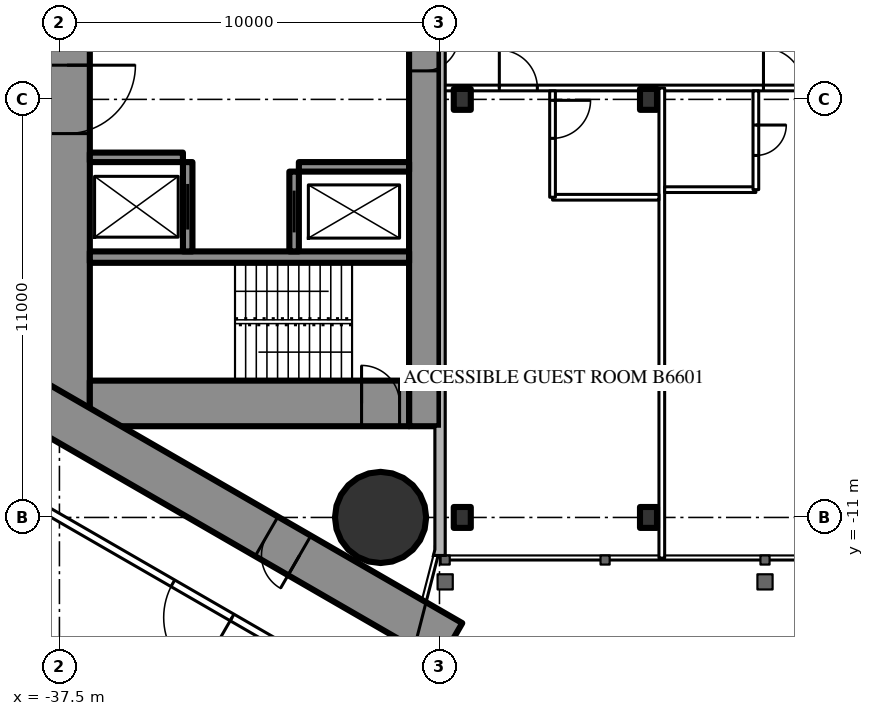
"""IFC4 building model, lengths in metres.
Left out: names, types, materials, properties, quantities, classifications, styles, units other than length and angle.
Written with IfcOpenShell. Run it as: python <this file> out.ifc"""

import sys

from ifc_helpers import new_model, si_unit, direction, frame, frame_2d, origin, origin_2d, place, context, subcontext, project, spatial, rectangle, circle, i_section, extrude, element, fill, save


model = new_model("IFC4")
c1 = context("Model", 3, precision=1e-05, world=origin(), true_north=direction((0.0, 1.0)))
c2 = subcontext(c1, "Body", "Model", "MODEL_VIEW")
j1 = project(units=[si_unit("LENGTHUNIT", "METRE"), si_unit("PLANEANGLEUNIT", "RADIAN")], contexts=[c1])
p1 = place(None, origin())
s1 = spatial("IfcSite", under=j1, at=p1, CompositionType="ELEMENT")
p2 = place(p1, origin())
s2 = spatial("IfcBuilding", under=s1, at=p2, CompositionType="ELEMENT")
p3 = place(p2, frame((0.0, 0.0, 247.7)))
s3 = spatial("IfcBuildingStorey", under=s2, at=p3, CompositionType="ELEMENT", Elevation=247.7)
p4 = place(p3, frame((-29.05, -11.0, 0.0), z_axis=(0.0, 0.0, 1.0), x_axis=(1.0, 0.0, 0.0)))
e1 = element("IfcColumn", 1, at=p4, inside=s3, PredefinedType="COLUMN", context=c2, shape_type="SweptSolid", body=[
    extrude(circle(Radius=1.2, at=origin_2d()), origin(), (0.0, 0.0, 1.0), 4.2),
])
p5 = place(p3, frame((-27.9, 8.6, 0.0), z_axis=(0.0, 0.0, 1.0), x_axis=(0.0, -1.0, 0.0)))
e2 = element("IfcWall", 2, at=p5, inside=s3, PredefinedType="SHEAR", context=c2, shape_type="SweptSolid", body=[
    extrude(rectangle(XDim=17.2, YDim=0.8, at=frame_2d((8.6, 0.0))), origin(), (0.0, 0.0, 1.0), 4.2),
])
p6 = place(p5, frame((6.95, 0.0, 0.0)))
e3 = element("IfcOpeningElement", 3, at=p6, cuts=e2, PredefinedType="OPENING", context=c2, shape_type="SweptSolid", body=[
    extrude(rectangle(XDim=0.9, YDim=2.2, at=frame_2d((0.45, 1.1))), frame((0.0, 0.41, 0.0), z_axis=(0.0, -1.0, 0.0), x_axis=(1.0, 0.0, 0.0)), (0.0, 0.0, 1.0), 0.82),
])
p7 = place(p3, frame((-37.3, 8.6, 0.0), z_axis=(0.0, 0.0, 1.0), x_axis=(0.0, -1.0, 0.0)))
e4 = element("IfcWall", 4, at=p7, inside=s3, PredefinedType="SHEAR", context=c2, shape_type="SweptSolid", body=[
    extrude(rectangle(XDim=17.2, YDim=1.2, at=frame_2d((8.6, 0.0))), origin(), (0.0, 0.0, 1.0), 4.2),
])
p8 = place(p7, frame((7.7, 0.0, 0.0)))
e5 = element("IfcOpeningElement", 5, at=p8, cuts=e4, PredefinedType="OPENING", context=c2, shape_type="SweptSolid", body=[
    extrude(rectangle(XDim=1.8, YDim=2.2, at=frame_2d((0.9, 1.1))), frame((0.0, 0.61, 0.0), z_axis=(0.0, -1.0, 0.0), x_axis=(1.0, 0.0, 0.0)), (0.0, 0.0, 1.0), 1.22),
])
p9 = place(p3, frame((-28.3, -8.0, 0.0), z_axis=(0.0, 0.0, 1.0), x_axis=(-1.0, 0.0, 0.0)))
e6 = element("IfcWall", 6, at=p9, inside=s3, PredefinedType="SHEAR", context=c2, shape_type="SweptSolid", body=[
    extrude(rectangle(XDim=8.4, YDim=1.2, at=frame_2d((4.2, 0.0))), origin(), (0.0, 0.0, 1.0), 4.2),
])
p10 = place(p9, frame((0.25, 0.0, 0.0)))
e7 = element("IfcOpeningElement", 7, at=p10, cuts=e6, PredefinedType="OPENING", context=c2, shape_type="SweptSolid", body=[
    extrude(rectangle(XDim=1.0, YDim=2.2, at=frame_2d((0.5, 1.1))), frame((0.0, 0.61, 0.0), z_axis=(0.0, -1.0, 0.0), x_axis=(1.0, 0.0, 0.0)), (0.0, 0.0, 1.0), 1.22),
])
p11 = place(p3, frame((-28.3, -4.15, 0.0), z_axis=(0.0, 0.0, 1.0), x_axis=(-1.0, 0.0, 0.0)))
e8 = element("IfcWall", 8, at=p11, inside=s3, PredefinedType="SHEAR", context=c2, shape_type="SweptSolid", body=[
    extrude(rectangle(XDim=8.4, YDim=0.3, at=frame_2d((4.2, 0.0))), origin(), (0.0, 0.0, 1.0), 4.2),
])
p12 = place(p3, frame((-31.325, -1.9, 0.0), z_axis=(0.0, 0.0, 1.0), x_axis=(0.0, -1.0, 0.0)))
e9 = element("IfcWall", 9, at=p12, inside=s3, PredefinedType="SHEAR", context=c2, shape_type="SweptSolid", body=[
    extrude(rectangle(XDim=2.1, YDim=0.25, at=frame_2d((1.05, 0.0))), origin(), (0.0, 0.0, 1.0), 4.2),
])
p13 = place(p12, frame((0.5, 0.0, 0.0)))
e10 = element("IfcOpeningElement", 10, at=p13, cuts=e9, PredefinedType="OPENING", context=c2, shape_type="SweptSolid", body=[
    extrude(rectangle(XDim=1.1, YDim=2.2, at=frame_2d((0.55, 1.1))), frame((0.0, 0.135, 0.0), z_axis=(0.0, -1.0, 0.0), x_axis=(1.0, 0.0, 0.0)), (0.0, 0.0, 1.0), 0.27),
])
p14 = place(p3, frame((-34.125, -1.65, 0.0), z_axis=(0.0, 0.0, 1.0), x_axis=(0.0, -1.0, 0.0)))
e11 = element("IfcWall", 11, at=p14, inside=s3, PredefinedType="SHEAR", context=c2, shape_type="SweptSolid", body=[
    extrude(rectangle(XDim=2.35, YDim=0.25, at=frame_2d((1.175, 0.0))), origin(), (0.0, 0.0, 1.0), 4.2),
])
p15 = place(p14, frame((0.575, 0.0, 0.0)))
e12 = element("IfcOpeningElement", 12, at=p15, cuts=e11, PredefinedType="OPENING", context=c2, shape_type="SweptSolid", body=[
    extrude(rectangle(XDim=1.2, YDim=2.2, at=frame_2d((0.6, 1.1))), frame((0.0, 0.135, 0.0), z_axis=(0.0, -1.0, 0.0), x_axis=(1.0, 0.0, 0.0)), (0.0, 0.0, 1.0), 0.27),
])
p16 = place(p3, frame((-28.3, -1.775, 0.0), z_axis=(0.0, 0.0, 1.0), x_axis=(-1.0, 0.0, 0.0)))
e13 = element("IfcWall", 13, at=p16, inside=s3, PredefinedType="SHEAR", context=c2, shape_type="SweptSolid", body=[
    extrude(rectangle(XDim=2.9, YDim=0.25, at=frame_2d((1.45, 0.0))), origin(), (0.0, 0.0, 1.0), 4.2),
])
p17 = place(p3, frame((-34.25, -1.525, 0.0), z_axis=(0.0, 0.0, 1.0), x_axis=(-1.0, 0.0, 0.0)))
e14 = element("IfcWall", 14, at=p17, inside=s3, PredefinedType="SHEAR", context=c2, shape_type="SweptSolid", body=[
    extrude(rectangle(XDim=2.45, YDim=0.25, at=frame_2d((1.225, 0.0))), origin(), (0.0, 0.0, 1.0), 4.2),
])
p18 = place(p3, frame((-27.2, 14.3, 0.0), z_axis=(0.0, 0.0, 1.0), x_axis=(-0.866026593062, -0.499997940104, 0.0)))
e15 = element("IfcWall", 15, at=p18, inside=s3, PredefinedType="SHEAR", context=c2, shape_type="SweptSolid", body=[
    extrude(rectangle(XDim=28.946, YDim=1.2, at=frame_2d((14.473, 0.0))), origin(), (0.0, 0.0, 1.0), 4.2),
])
p19 = place(p18, frame((4.6, 0.0, 0.0)))
e16 = element("IfcOpeningElement", 16, at=p19, cuts=e15, PredefinedType="OPENING", context=c2, shape_type="SweptSolid", body=[
    extrude(rectangle(XDim=1.0, YDim=2.2, at=frame_2d((0.5, 1.1))), frame((0.0, 0.61, 0.0), z_axis=(0.0, -1.0, 0.0), x_axis=(1.0, 0.0, 0.0)), (0.0, 0.0, 1.0), 1.22),
])
p20 = place(p18, frame((13.395, 0.0, 0.0)))
e17 = element("IfcOpeningElement", 17, at=p20, cuts=e15, PredefinedType="OPENING", context=c2, shape_type="SweptSolid", body=[
    extrude(rectangle(XDim=1.8, YDim=2.2, at=frame_2d((0.9, 1.1))), frame((0.0, 0.61, 0.0), z_axis=(0.0, -1.0, 0.0), x_axis=(1.0, 0.0, 0.0)), (0.0, 0.0, 1.0), 1.22),
])
p21 = place(p3, frame((-27.2, -14.3, 0.0), z_axis=(0.0, 0.0, 1.0), x_axis=(-0.866024021859, 0.500002393557, 0.0)))
e18 = element("IfcWall", 18, at=p21, inside=s3, PredefinedType="SHEAR", context=c2, shape_type="SweptSolid", body=[
    extrude(rectangle(XDim=27.907, YDim=1.2, at=frame_2d((13.954, 0.0))), origin(), (0.0, 0.0, 1.0), 4.2),
])
p22 = place(p21, frame((4.6, 0.0, 0.0)))
e19 = element("IfcOpeningElement", 19, at=p22, cuts=e18, PredefinedType="OPENING", context=c2, shape_type="SweptSolid", body=[
    extrude(rectangle(XDim=1.0, YDim=2.2, at=frame_2d((0.5, 1.1))), frame((0.0, 0.61, 0.0), z_axis=(0.0, -1.0, 0.0), x_axis=(1.0, 0.0, 0.0)), (0.0, 0.0, 1.0), 1.22),
])
p23 = place(p21, frame((13.395, 0.0, 0.0)))
e20 = element("IfcOpeningElement", 20, at=p23, cuts=e18, PredefinedType="OPENING", context=c2, shape_type="SweptSolid", body=[
    extrude(rectangle(XDim=1.8, YDim=2.2, at=frame_2d((0.9, 1.1))), frame((0.0, 0.61, 0.0), z_axis=(0.0, -1.0, 0.0), x_axis=(1.0, 0.0, 0.0)), (0.0, 0.0, 1.0), 1.22),
])
for number, where, z_axis, x_axis in (
    (21, (-26.9, -11.0, 0.0), (0.0, 0.0, 1.0), (1.0, 0.0, 0.0)),
    (22, (-22.0, -11.0, 0.0), (0.0, 0.0, 1.0), (1.0, 0.0, 0.0)),
    (23, (-26.9, 0.0, 0.0), (0.0, 0.0, 1.0), (1.0, 0.0, 0.0)),
    (24, (-22.0, 0.0, 0.0), (0.0, 0.0, 1.0), (1.0, 0.0, 0.0)),
):
    element("IfcColumn", number, at=place(p3, frame(where, z_axis=z_axis, x_axis=x_axis)), inside=s3, PredefinedType="COLUMN", context=c2, shape_type="SweptSolid", body=[
        extrude(i_section(OverallWidth=0.448, OverallDepth=0.55, WebThickness=0.072, FlangeThickness=0.115, FilletRadius=0.02, at=origin_2d()), origin(), (0.0, 0.0, 1.0), 4.2),
    ])
p24 = place(p3, frame((-28.681, 16.101, 0.0), z_axis=(0.0, 0.0, 1.0), x_axis=(-0.866024860443, -0.500000941094, 0.0)))
e25 = element("IfcWall", 25, at=p24, inside=s3, PredefinedType="PARTITIONING", context=c2, shape_type="SweptSolid", body=[
    extrude(rectangle(XDim=32.201, YDim=0.2, at=frame_2d((16.101, 0.0))), origin(), (0.0, 0.0, 1.0), 3.95),
])
p25 = place(p24, frame((7.266, 0.0, 0.0)))
e26 = element("IfcOpeningElement", 26, at=p25, cuts=e25, PredefinedType="OPENING", context=c2, shape_type="SweptSolid", body=[
    extrude(rectangle(XDim=1.8, YDim=2.2, at=frame_2d((0.9, 1.1))), frame((0.0, 0.11, 0.0), z_axis=(0.0, -1.0, 0.0), x_axis=(1.0, 0.0, 0.0)), (0.0, 0.0, 1.0), 0.22),
])
p26 = place(p24, frame((17.281, 0.0, 0.0)))
e27 = element("IfcOpeningElement", 27, at=p26, cuts=e25, PredefinedType="OPENING", context=c2, shape_type="SweptSolid", body=[
    extrude(rectangle(XDim=1.8, YDim=2.2, at=frame_2d((0.9, 1.1))), frame((0.0, 0.11, 0.0), z_axis=(0.0, -1.0, 0.0), x_axis=(1.0, 0.0, 0.0)), (0.0, 0.0, 1.0), 0.22),
])
p27 = place(p24, frame((21.43, 0.0, 0.0)))
e28 = element("IfcOpeningElement", 28, at=p27, cuts=e25, PredefinedType="OPENING", context=c2, shape_type="SweptSolid", body=[
    extrude(rectangle(XDim=1.8, YDim=2.2, at=frame_2d((0.9, 1.1))), frame((0.0, 0.11, 0.0), z_axis=(0.0, -1.0, 0.0), x_axis=(1.0, 0.0, 0.0)), (0.0, 0.0, 1.0), 0.22),
])
p28 = place(p24, frame((27.29, 0.0, 0.0)))
e29 = element("IfcOpeningElement", 29, at=p28, cuts=e25, PredefinedType="OPENING", context=c2, shape_type="SweptSolid", body=[
    extrude(rectangle(XDim=1.8, YDim=2.2, at=frame_2d((0.9, 1.1))), frame((0.0, 0.11, 0.0), z_axis=(0.0, -1.0, 0.0), x_axis=(1.0, 0.0, 0.0)), (0.0, 0.0, 1.0), 0.22),
])
p29 = place(p3, frame((-28.681, -16.101, 0.0), z_axis=(0.0, 0.0, 1.0), x_axis=(-0.866026079773, 0.499998829152, 0.0)))
e30 = element("IfcWall", 30, at=p29, inside=s3, PredefinedType="PARTITIONING", context=c2, shape_type="SweptSolid", body=[
    extrude(rectangle(XDim=11.674, YDim=0.2, at=frame_2d((5.837, 0.0))), origin(), (0.0, 0.0, 1.0), 3.95),
])
p30 = place(p29, frame((4.937, 0.0, 0.0)))
e31 = element("IfcOpeningElement", 31, at=p30, cuts=e30, PredefinedType="OPENING", context=c2, shape_type="SweptSolid", body=[
    extrude(rectangle(XDim=1.8, YDim=2.2, at=frame_2d((0.9, 1.1))), frame((0.0, 0.11, 0.0), z_axis=(0.0, -1.0, 0.0), x_axis=(1.0, 0.0, 0.0)), (0.0, 0.0, 1.0), 0.22),
])
p31 = place(p3, frame((-27.5, 0.3, 0.0), z_axis=(0.0, 0.0, 1.0), x_axis=(1.0, 0.0, 0.0)))
e32 = element("IfcWall", 32, at=p31, inside=s3, PredefinedType="PARTITIONING", context=c2, shape_type="SweptSolid", body=[
    extrude(rectangle(XDim=55.0, YDim=0.15, at=frame_2d((27.5, 0.0))), origin(), (0.0, 0.0, 1.0), 3.0),
])
p32 = place(p31, frame((1.575, 0.0, 0.0)))
e33 = element("IfcOpeningElement", 33, at=p32, cuts=e32, PredefinedType="OPENING", context=c2, shape_type="SweptSolid", body=[
    extrude(rectangle(XDim=1.0, YDim=2.2, at=frame_2d((0.5, 1.1))), frame((0.0, 0.085, 0.0), z_axis=(0.0, -1.0, 0.0), x_axis=(1.0, 0.0, 0.0)), (0.0, 0.0, 1.0), 0.17),
])
p33 = place(p31, frame((8.525, 0.0, 0.0)))
e34 = element("IfcOpeningElement", 34, at=p33, cuts=e32, PredefinedType="OPENING", context=c2, shape_type="SweptSolid", body=[
    extrude(rectangle(XDim=1.05, YDim=2.4, at=frame_2d((0.525, 1.2))), frame((0.0, 0.085, 0.0), z_axis=(0.0, -1.0, 0.0), x_axis=(1.0, 0.0, 0.0)), (0.0, 0.0, 1.0), 0.17),
])
p34 = place(p31, frame((19.525, 0.0, 0.0)))
e35 = element("IfcOpeningElement", 35, at=p34, cuts=e32, PredefinedType="OPENING", context=c2, shape_type="SweptSolid", body=[
    extrude(rectangle(XDim=1.05, YDim=2.4, at=frame_2d((0.525, 1.2))), frame((0.0, 0.085, 0.0), z_axis=(0.0, -1.0, 0.0), x_axis=(1.0, 0.0, 0.0)), (0.0, 0.0, 1.0), 0.17),
])
p35 = place(p31, frame((25.025, 0.0, 0.0)))
e36 = element("IfcOpeningElement", 36, at=p35, cuts=e32, PredefinedType="OPENING", context=c2, shape_type="SweptSolid", body=[
    extrude(rectangle(XDim=1.05, YDim=2.4, at=frame_2d((0.525, 1.2))), frame((0.0, 0.085, 0.0), z_axis=(0.0, -1.0, 0.0), x_axis=(1.0, 0.0, 0.0)), (0.0, 0.0, 1.0), 0.17),
])
p36 = place(p31, frame((30.525, 0.0, 0.0)))
e37 = element("IfcOpeningElement", 37, at=p36, cuts=e32, PredefinedType="OPENING", context=c2, shape_type="SweptSolid", body=[
    extrude(rectangle(XDim=1.05, YDim=2.4, at=frame_2d((0.525, 1.2))), frame((0.0, 0.085, 0.0), z_axis=(0.0, -1.0, 0.0), x_axis=(1.0, 0.0, 0.0)), (0.0, 0.0, 1.0), 0.17),
])
p37 = place(p31, frame((41.525, 0.0, 0.0)))
e38 = element("IfcOpeningElement", 38, at=p37, cuts=e32, PredefinedType="OPENING", context=c2, shape_type="SweptSolid", body=[
    extrude(rectangle(XDim=1.05, YDim=2.4, at=frame_2d((0.525, 1.2))), frame((0.0, 0.085, 0.0), z_axis=(0.0, -1.0, 0.0), x_axis=(1.0, 0.0, 0.0)), (0.0, 0.0, 1.0), 0.17),
])
p38 = place(p31, frame((52.525, 0.0, 0.0)))
e39 = element("IfcOpeningElement", 39, at=p38, cuts=e32, PredefinedType="OPENING", context=c2, shape_type="SweptSolid", body=[
    extrude(rectangle(XDim=1.05, YDim=2.4, at=frame_2d((0.525, 1.2))), frame((0.0, 0.085, 0.0), z_axis=(0.0, -1.0, 0.0), x_axis=(1.0, 0.0, 0.0)), (0.0, 0.0, 1.0), 0.17),
])
p39 = place(p3, frame((-21.65, -12.07, 0.0), z_axis=(0.0, 0.0, 1.0), x_axis=(0.0, 1.0, 0.0)))
e40 = element("IfcWall", 40, at=p39, inside=s3, PredefinedType="PARTITIONING", context=c2, shape_type="SweptSolid", body=[
    extrude(rectangle(XDim=12.37, YDim=0.15, at=frame_2d((6.185, 0.0))), origin(), (0.0, 0.0, 1.0), 4.0),
])
p40 = place(p3, frame((-24.525, -2.575, 0.0), z_axis=(0.0, 0.0, 1.0), x_axis=(1.0, 0.0, 0.0)))
e41 = element("IfcWall", 41, at=p40, inside=s3, PredefinedType="PARTITIONING", context=c2, shape_type="SweptSolid", body=[
    extrude(rectangle(XDim=2.8, YDim=0.15, at=frame_2d((1.4, 0.0))), origin(), (0.0, 0.0, 1.0), 4.0),
])
p41 = place(p3, frame((-24.525, -2.575, 0.0), z_axis=(0.0, 0.0, 1.0), x_axis=(0.0, 1.0, 0.0)))
e42 = element("IfcWall", 42, at=p41, inside=s3, PredefinedType="PARTITIONING", context=c2, shape_type="SweptSolid", body=[
    extrude(rectangle(XDim=2.8, YDim=0.15, at=frame_2d((1.4, 0.0))), origin(), (0.0, 0.0, 1.0), 4.0),
])
p42 = place(p41, frame((1.55, 0.0, 0.0)))
e43 = element("IfcOpeningElement", 43, at=p42, cuts=e42, PredefinedType="OPENING", context=c2, shape_type="SweptSolid", body=[
    extrude(rectangle(XDim=1.0, YDim=2.2, at=frame_2d((0.5, 1.1))), frame((0.0, 0.085, 0.0), z_axis=(0.0, -1.0, 0.0), x_axis=(1.0, 0.0, 0.0)), (0.0, 0.0, 1.0), 0.17),
])
p43 = place(p3, frame((-21.575, -2.375, 0.0), z_axis=(0.0, 0.0, 1.0), x_axis=(1.0, 0.0, 0.0)))
e44 = element("IfcWall", 44, at=p43, inside=s3, PredefinedType="PARTITIONING", context=c2, shape_type="SweptSolid", body=[
    extrude(rectangle(XDim=2.4, YDim=0.15, at=frame_2d((1.2, 0.0))), origin(), (0.0, 0.0, 1.0), 4.0),
])
p44 = place(p3, frame((-19.175, -2.375, 0.0), z_axis=(0.0, 0.0, 1.0), x_axis=(0.0, 1.0, 0.0)))
e45 = element("IfcWall", 45, at=p44, inside=s3, PredefinedType="PARTITIONING", context=c2, shape_type="SweptSolid", body=[
    extrude(rectangle(XDim=2.6, YDim=0.15, at=frame_2d((1.3, 0.0))), origin(), (0.0, 0.0, 1.0), 4.0),
])
p45 = place(p44, frame((0.9, 0.0, 0.0)))
e46 = element("IfcOpeningElement", 46, at=p45, cuts=e45, PredefinedType="OPENING", context=c2, shape_type="SweptSolid", body=[
    extrude(rectangle(XDim=0.8, YDim=2.2, at=frame_2d((0.4, 1.1))), frame((0.0, 0.085, 0.0), z_axis=(0.0, -1.0, 0.0), x_axis=(1.0, 0.0, 0.0)), (0.0, 0.0, 1.0), 0.17),
])
p46 = place(p30, origin())
e47 = element("IfcDoor", 47, at=p46, inside=s3, OperationType="DOUBLE_DOOR_SINGLE_SWING", PredefinedType="DOOR", context=c2, shape_type="SweptSolid", body=[
    extrude(rectangle(XDim=1.8, YDim=2.2, at=frame_2d((0.9, 1.1))), frame((0.0, 0.025, 0.0), z_axis=(0.0, -1.0, 0.0), x_axis=(1.0, 0.0, 0.0)), (0.0, 0.0, 1.0), 0.05),
])
fill(e31, e47)
p47 = place(p22, origin())
e48 = element("IfcDoor", 48, at=p47, inside=s3, OperationType="SINGLE_SWING_LEFT", PredefinedType="DOOR", context=c2, shape_type="SweptSolid", body=[
    extrude(rectangle(XDim=1.0, YDim=2.2, at=frame_2d((0.5, 1.1))), frame((0.0, 0.025, 0.0), z_axis=(0.0, -1.0, 0.0), x_axis=(1.0, 0.0, 0.0)), (0.0, 0.0, 1.0), 0.05),
])
fill(e19, e48)
p48 = place(p8, origin())
e49 = element("IfcDoor", 49, at=p48, inside=s3, OperationType="DOUBLE_DOOR_SINGLE_SWING", PredefinedType="DOOR", context=c2, shape_type="SweptSolid", body=[
    extrude(rectangle(XDim=1.8, YDim=2.2, at=frame_2d((0.9, 1.1))), frame((0.0, 0.025, 0.0), z_axis=(0.0, -1.0, 0.0), x_axis=(1.0, 0.0, 0.0)), (0.0, 0.0, 1.0), 0.05),
])
fill(e5, e49)
p49 = place(p10, origin())
e50 = element("IfcDoor", 50, at=p49, inside=s3, OperationType="SINGLE_SWING_RIGHT", PredefinedType="DOOR", context=c2, shape_type="SweptSolid", body=[
    extrude(rectangle(XDim=1.0, YDim=2.2, at=frame_2d((0.5, 1.1))), frame((0.0, 0.025, 0.0), z_axis=(0.0, -1.0, 0.0), x_axis=(1.0, 0.0, 0.0)), (0.0, 0.0, 1.0), 0.05),
])
fill(e7, e50)
p50 = place(p6, origin())
e51 = element("IfcDoor", 51, at=p50, inside=s3, OperationType="SINGLE_SWING_LEFT", PredefinedType="DOOR", context=c2, shape_type="SweptSolid", body=[
    extrude(rectangle(XDim=0.9, YDim=2.2, at=frame_2d((0.45, 1.1))), frame((0.0, 0.025, 0.0), z_axis=(0.0, -1.0, 0.0), x_axis=(1.0, 0.0, 0.0)), (0.0, 0.0, 1.0), 0.05),
])
fill(e3, e51)
p51 = place(p42, origin())
e52 = element("IfcDoor", 52, at=p51, inside=s3, OperationType="SINGLE_SWING_RIGHT", PredefinedType="DOOR", context=c2, shape_type="SweptSolid", body=[
    extrude(rectangle(XDim=1.0, YDim=2.2, at=frame_2d((0.5, 1.1))), frame((0.0, 0.025, 0.0), z_axis=(0.0, -1.0, 0.0), x_axis=(1.0, 0.0, 0.0)), (0.0, 0.0, 1.0), 0.05),
])
fill(e43, e52)
p52 = place(p32, origin())
e53 = element("IfcDoor", 53, at=p52, inside=s3, OperationType="SINGLE_SWING_LEFT", PredefinedType="DOOR", context=c2, shape_type="SweptSolid", body=[
    extrude(rectangle(XDim=1.0, YDim=2.2, at=frame_2d((0.5, 1.1))), frame((0.0, 0.025, 0.0), z_axis=(0.0, -1.0, 0.0), x_axis=(1.0, 0.0, 0.0)), (0.0, 0.0, 1.0), 0.05),
])
fill(e33, e53)
p53 = place(p45, origin())
e54 = element("IfcDoor", 54, at=p53, inside=s3, OperationType="SINGLE_SWING_RIGHT", PredefinedType="DOOR", context=c2, shape_type="SweptSolid", body=[
    extrude(rectangle(XDim=0.8, YDim=2.2, at=frame_2d((0.4, 1.1))), frame((0.0, 0.025, 0.0), z_axis=(0.0, -1.0, 0.0), x_axis=(1.0, 0.0, 0.0)), (0.0, 0.0, 1.0), 0.05),
])
fill(e46, e54)
p54 = place(p33, origin())
e55 = element("IfcDoor", 55, at=p54, inside=s3, OperationType="SINGLE_SWING_LEFT", PredefinedType="DOOR", context=c2, shape_type="SweptSolid", body=[
    extrude(rectangle(XDim=1.05, YDim=2.4, at=frame_2d((0.525, 1.2))), frame((0.0, 0.025, 0.0), z_axis=(0.0, -1.0, 0.0), x_axis=(1.0, 0.0, 0.0)), (0.0, 0.0, 1.0), 0.05),
])
fill(e34, e55)
p55 = place(p13, origin())
e56 = element("IfcDoor", 56, at=p55, inside=s3, OperationType="SLIDING_TO_LEFT", PredefinedType="USERDEFINED", context=c2, shape_type="SweptSolid", body=[
    extrude(rectangle(XDim=1.1, YDim=2.2, at=frame_2d((0.55, 1.1))), frame((0.0, 0.025, 0.0), z_axis=(0.0, -1.0, 0.0), x_axis=(1.0, 0.0, 0.0)), (0.0, 0.0, 1.0), 0.05),
])
fill(e10, e56)
p56 = place(p15, origin())
e57 = element("IfcDoor", 57, at=p56, inside=s3, OperationType="DOUBLE_DOOR_SLIDING", PredefinedType="USERDEFINED", context=c2, shape_type="SweptSolid", body=[
    extrude(rectangle(XDim=1.2, YDim=2.2, at=frame_2d((0.6, 1.1))), frame((0.0, 0.025, 0.0), z_axis=(0.0, -1.0, 0.0), x_axis=(1.0, 0.0, 0.0)), (0.0, 0.0, 1.0), 0.05),
])
fill(e12, e57)
save(model, sys.argv[1])
